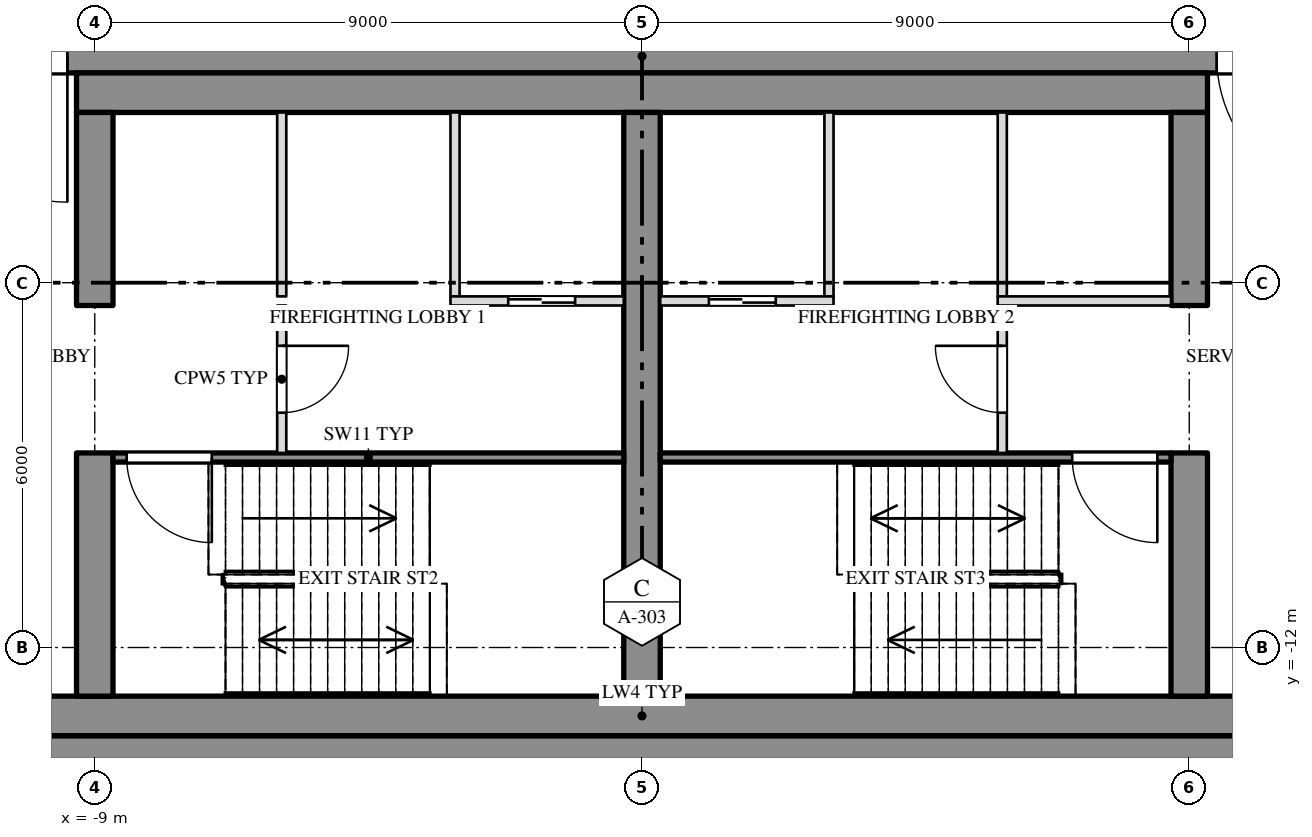
"""IFC4 building model, lengths in metres.
Left out: names, types, materials, properties, quantities, classifications, styles, units other than length and angle.
Written with IfcOpenShell. Run it as: python <this file> out.ifc"""

import sys

from ifc_helpers import new_model, si_unit, direction, frame, frame_2d, origin, place, context, subcontext, project, spatial, rectangle, extrude, element, fill, save


model = new_model("IFC4")
c1 = context("Model", 3, precision=1e-05, world=origin(), true_north=direction((0.0, 1.0)))
c2 = subcontext(c1, "Body", "Model", "MODEL_VIEW")
j1 = project(units=[si_unit("LENGTHUNIT", "METRE"), si_unit("PLANEANGLEUNIT", "RADIAN")], contexts=[c1])
p1 = place(None, origin())
s1 = spatial("IfcSite", under=j1, at=p1, CompositionType="ELEMENT")
p2 = place(p1, origin())
s2 = spatial("IfcBuilding", under=s1, at=p2, CompositionType="ELEMENT")
p3 = place(p2, frame((0.0, 0.0, 268.5)))
s3 = spatial("IfcBuildingStorey", under=s2, at=p3, CompositionType="ELEMENT", Elevation=268.5)
p4 = place(p3, frame((-27.0, -2.275, 0.0), z_axis=(0.0, 0.0, 1.0), x_axis=(1.0, 0.0, 0.0)))
e1 = element("IfcWall", 1, at=p4, inside=s3, PredefinedType="SHEAR", context=c2, shape_type="SweptSolid", body=[
    extrude(rectangle(XDim=54.0, YDim=0.55, at=frame_2d((27.0, 0.0))), origin(), (0.0, 0.0, 1.0), 3.78),
])
p5 = place(p4, frame((15.15, 0.0, 0.0)))
e2 = element("IfcOpeningElement", 2, at=p5, cuts=e1, PredefinedType="OPENING", context=c2, shape_type="SweptSolid", body=[
    extrude(rectangle(XDim=2.4, YDim=2.1, at=frame_2d((1.2, 1.05))), frame((0.0, 0.287, 0.0), z_axis=(0.0, -1.0, 0.0), x_axis=(1.0, 0.0, 0.0)), (0.0, 0.0, 1.0), 0.574),
])
p6 = place(p4, frame((36.45, 0.0, 0.0)))
e3 = element("IfcOpeningElement", 3, at=p6, cuts=e1, PredefinedType="OPENING", context=c2, shape_type="SweptSolid", body=[
    extrude(rectangle(XDim=2.4, YDim=2.1, at=frame_2d((1.2, 1.05))), frame((0.0, 0.287, 0.0), z_axis=(0.0, -1.0, 0.0), x_axis=(1.0, 0.0, 0.0)), (0.0, 0.0, 1.0), 0.574),
])
p7 = place(p3, frame((-27.0, -13.725, 0.0), z_axis=(0.0, 0.0, 1.0), x_axis=(1.0, 0.0, 0.0)))
e4 = element("IfcWall", 4, at=p7, inside=s3, PredefinedType="SHEAR", context=c2, shape_type="SweptSolid", body=[
    extrude(rectangle(XDim=54.0, YDim=0.55, at=frame_2d((27.0, 0.0))), origin(), (0.0, 0.0, 1.0), 3.78),
])
p8 = place(p3, frame((-9.3, -2.875, 0.0), z_axis=(0.0, 0.0, 1.0), x_axis=(1.0, 0.0, 0.0)))
e5 = element("IfcWall", 5, at=p8, inside=s3, PredefinedType="SHEAR", context=c2, shape_type="SweptSolid", body=[
    extrude(rectangle(XDim=18.6, YDim=0.65, at=frame_2d((9.3, 0.0))), origin(), (0.0, 0.0, 1.0), 3.78),
])
p9 = place(p3, frame((-26.45, -13.125, 0.0), z_axis=(0.0, 0.0, 1.0), x_axis=(1.0, 0.0, 0.0)))
e6 = element("IfcWall", 6, at=p9, inside=s3, PredefinedType="SHEAR", context=c2, shape_type="SweptSolid", body=[
    extrude(rectangle(XDim=52.9, YDim=0.65, at=frame_2d((26.45, 0.0))), origin(), (0.0, 0.0, 1.0), 3.78),
])
p10 = place(p3, frame((-9.0, -12.8, 0.0), z_axis=(0.0, 0.0, 1.0), x_axis=(0.0, 1.0, 0.0)))
e7 = element("IfcWall", 7, at=p10, inside=s3, PredefinedType="SHEAR", context=c2, shape_type="SweptSolid", body=[
    extrude(rectangle(XDim=4.0, YDim=0.6, at=frame_2d((2.0, 0.0))), origin(), (0.0, 0.0, 1.0), 3.78),
])
p11 = place(p3, frame((-9.0, -6.375, 0.0), z_axis=(0.0, 0.0, 1.0), x_axis=(0.0, 1.0, 0.0)))
e8 = element("IfcWall", 8, at=p11, inside=s3, PredefinedType="SHEAR", context=c2, shape_type="SweptSolid", body=[
    extrude(rectangle(XDim=3.175, YDim=0.6, at=frame_2d((1.587, 0.0))), origin(), (0.0, 0.0, 1.0), 3.78),
])
p12 = place(p3, frame((0.0, -12.8, 0.0), z_axis=(0.0, 0.0, 1.0), x_axis=(0.0, 1.0, 0.0)))
e9 = element("IfcWall", 9, at=p12, inside=s3, PredefinedType="SHEAR", context=c2, shape_type="SweptSolid", body=[
    extrude(rectangle(XDim=9.6, YDim=0.6, at=frame_2d((4.8, 0.0))), origin(), (0.0, 0.0, 1.0), 3.78),
])
p13 = place(p3, frame((9.0, -12.8, 0.0), z_axis=(0.0, 0.0, 1.0), x_axis=(0.0, 1.0, 0.0)))
e10 = element("IfcWall", 10, at=p13, inside=s3, PredefinedType="SHEAR", context=c2, shape_type="SweptSolid", body=[
    extrude(rectangle(XDim=4.0, YDim=0.6, at=frame_2d((2.0, 0.0))), origin(), (0.0, 0.0, 1.0), 3.78),
])
p14 = place(p3, frame((9.0, -6.375, 0.0), z_axis=(0.0, 0.0, 1.0), x_axis=(0.0, 1.0, 0.0)))
e11 = element("IfcWall", 11, at=p14, inside=s3, PredefinedType="SHEAR", context=c2, shape_type="SweptSolid", body=[
    extrude(rectangle(XDim=3.175, YDim=0.6, at=frame_2d((1.587, 0.0))), origin(), (0.0, 0.0, 1.0), 3.78),
])
for number, where, z_axis, x_axis in (
    (12, (-3.075, -6.225, 0.0), (0.0, 0.0, 1.0), (0.0, 1.0, 0.0)),
    (13, (-5.925, -6.225, 0.0), (0.0, 0.0, 1.0), (0.0, 1.0, 0.0)),
    (14, (3.075, -6.225, 0.0), (0.0, 0.0, 1.0), (0.0, 1.0, 0.0)),
    (15, (5.925, -6.225, 0.0), (0.0, 0.0, 1.0), (0.0, 1.0, 0.0)),
):
    element("IfcWall", number, at=place(p3, frame(where, z_axis=z_axis, x_axis=x_axis)), inside=s3, PredefinedType="PARTITIONING", context=c2, shape_type="SweptSolid", body=[
        extrude(rectangle(XDim=3.025, YDim=0.15, at=frame_2d((1.513, 0.0))), origin(), (0.0, 0.0, 1.0), 3.78),
    ])
p15 = place(p3, frame((-5.925, -8.8, 0.0), z_axis=(0.0, 0.0, 1.0), x_axis=(0.0, 1.0, 0.0)))
e16 = element("IfcWall", 16, at=p15, inside=s3, PredefinedType="PARTITIONING", context=c2, shape_type="SweptSolid", body=[
    extrude(rectangle(XDim=2.425, YDim=0.15, at=frame_2d((1.212, 0.0))), origin(), (0.0, 0.0, 1.0), 3.78),
])
p16 = place(p15, frame((0.662, 0.0, 0.0)))
e17 = element("IfcOpeningElement", 17, at=p16, cuts=e16, PredefinedType="OPENING", context=c2, shape_type="SweptSolid", body=[
    extrude(rectangle(XDim=1.1, YDim=2.1, at=frame_2d((0.55, 1.05))), frame((0.0, 0.087, 0.0), z_axis=(0.0, -1.0, 0.0), x_axis=(1.0, 0.0, 0.0)), (0.0, 0.0, 1.0), 0.174),
])
p17 = place(p3, frame((5.925, -8.8, 0.0), z_axis=(0.0, 0.0, 1.0), x_axis=(0.0, 1.0, 0.0)))
e18 = element("IfcWall", 18, at=p17, inside=s3, PredefinedType="PARTITIONING", context=c2, shape_type="SweptSolid", body=[
    extrude(rectangle(XDim=2.425, YDim=0.15, at=frame_2d((1.212, 0.0))), origin(), (0.0, 0.0, 1.0), 3.78),
])
p18 = place(p17, frame((0.662, 0.0, 0.0)))
e19 = element("IfcOpeningElement", 19, at=p18, cuts=e18, PredefinedType="OPENING", context=c2, shape_type="SweptSolid", body=[
    extrude(rectangle(XDim=1.1, YDim=2.1, at=frame_2d((0.55, 1.05))), frame((0.0, 0.087, 0.0), z_axis=(0.0, -1.0, 0.0), x_axis=(1.0, 0.0, 0.0)), (0.0, 0.0, 1.0), 0.174),
])
p19 = place(p3, frame((-3.15, -6.3, 0.0), z_axis=(0.0, 0.0, 1.0), x_axis=(1.0, 0.0, 0.0)))
e20 = element("IfcWall", 20, at=p19, inside=s3, PredefinedType="PARTITIONING", context=c2, shape_type="SweptSolid", body=[
    extrude(rectangle(XDim=2.85, YDim=0.15, at=frame_2d((1.425, 0.0))), origin(), (0.0, 0.0, 1.0), 3.78),
])
p20 = place(p19, frame((0.95, 0.0, 0.0)))
e21 = element("IfcOpeningElement", 21, at=p20, cuts=e20, PredefinedType="OPENING", context=c2, shape_type="SweptSolid", body=[
    extrude(rectangle(XDim=1.1, YDim=2.1, at=frame_2d((0.55, 1.05))), frame((0.0, 0.087, 0.0), z_axis=(0.0, -1.0, 0.0), x_axis=(1.0, 0.0, 0.0)), (0.0, 0.0, 1.0), 0.174),
])
p21 = place(p3, frame((0.3, -6.3, 0.0), z_axis=(0.0, 0.0, 1.0), x_axis=(1.0, 0.0, 0.0)))
e22 = element("IfcWall", 22, at=p21, inside=s3, PredefinedType="PARTITIONING", context=c2, shape_type="SweptSolid", body=[
    extrude(rectangle(XDim=2.85, YDim=0.15, at=frame_2d((1.425, 0.0))), origin(), (0.0, 0.0, 1.0), 3.78),
])
p22 = place(p21, frame((0.8, 0.0, 0.0)))
e23 = element("IfcOpeningElement", 23, at=p22, cuts=e22, PredefinedType="OPENING", context=c2, shape_type="SweptSolid", body=[
    extrude(rectangle(XDim=1.1, YDim=2.1, at=frame_2d((0.55, 1.05))), frame((0.0, 0.087, 0.0), z_axis=(0.0, -1.0, 0.0), x_axis=(1.0, 0.0, 0.0)), (0.0, 0.0, 1.0), 0.174),
])
p23 = place(p3, frame((5.85, -6.3, 0.0), z_axis=(0.0, 0.0, 1.0), x_axis=(1.0, 0.0, 0.0)))
e24 = element("IfcWall", 24, at=p23, inside=s3, PredefinedType="PARTITIONING", context=c2, shape_type="SweptSolid", body=[
    extrude(rectangle(XDim=2.85, YDim=0.15, at=frame_2d((1.425, 0.0))), origin(), (0.0, 0.0, 1.0), 3.78),
])
p24 = place(p3, frame((-8.7, -8.875, 0.0), z_axis=(0.0, 0.0, 1.0), x_axis=(1.0, 0.0, 0.0)))
e25 = element("IfcWall", 25, at=p24, inside=s3, PredefinedType="SHEAR", context=c2, shape_type="SweptSolid", body=[
    extrude(rectangle(XDim=8.4, YDim=0.15, at=frame_2d((4.2, 0.0))), origin(), (0.0, 0.0, 1.0), 3.78),
])
p25 = place(p24, frame((0.225, 0.0, 0.0)))
e26 = element("IfcOpeningElement", 26, at=p25, cuts=e25, PredefinedType="OPENING", context=c2, shape_type="SweptSolid", body=[
    extrude(rectangle(XDim=1.4, YDim=2.1, at=frame_2d((0.7, 1.05))), frame((0.0, 0.087, 0.0), z_axis=(0.0, -1.0, 0.0), x_axis=(1.0, 0.0, 0.0)), (0.0, 0.0, 1.0), 0.174),
])
p26 = place(p3, frame((0.3, -8.875, 0.0), z_axis=(0.0, 0.0, 1.0), x_axis=(1.0, 0.0, 0.0)))
e27 = element("IfcWall", 27, at=p26, inside=s3, PredefinedType="SHEAR", context=c2, shape_type="SweptSolid", body=[
    extrude(rectangle(XDim=8.4, YDim=0.15, at=frame_2d((4.2, 0.0))), origin(), (0.0, 0.0, 1.0), 3.78),
])
p27 = place(p26, frame((6.775, 0.0, 0.0)))
e28 = element("IfcOpeningElement", 28, at=p27, cuts=e27, PredefinedType="OPENING", context=c2, shape_type="SweptSolid", body=[
    extrude(rectangle(XDim=1.4, YDim=2.1, at=frame_2d((0.7, 1.05))), frame((0.0, 0.087, 0.0), z_axis=(0.0, -1.0, 0.0), x_axis=(1.0, 0.0, 0.0)), (0.0, 0.0, 1.0), 0.174),
])
p28 = place(p5, origin())
e29 = element("IfcDoor", 29, at=p28, inside=s3, OperationType="DOUBLE_DOOR_SINGLE_SWING", PredefinedType="DOOR", context=c2, shape_type="SweptSolid", body=[
    extrude(rectangle(XDim=2.4, YDim=2.1, at=frame_2d((1.2, 1.05))), frame((0.0, 0.025, 0.0), z_axis=(0.0, -1.0, 0.0), x_axis=(1.0, 0.0, 0.0)), (0.0, 0.0, 1.0), 0.05),
])
fill(e2, e29)
p29 = place(p25, origin())
e30 = element("IfcDoor", 30, at=p29, inside=s3, OperationType="DOUBLE_DOOR_SINGLE_SWING", PredefinedType="DOOR", context=c2, shape_type="SweptSolid", body=[
    extrude(rectangle(XDim=1.4, YDim=2.1, at=frame_2d((0.7, 1.05))), frame((0.0, 0.025, 0.0), z_axis=(0.0, -1.0, 0.0), x_axis=(1.0, 0.0, 0.0)), (0.0, 0.0, 1.0), 0.05),
])
fill(e26, e30)
p30 = place(p16, origin())
e31 = element("IfcDoor", 31, at=p30, inside=s3, OperationType="SINGLE_SWING_LEFT", PredefinedType="DOOR", context=c2, shape_type="SweptSolid", body=[
    extrude(rectangle(XDim=1.1, YDim=2.1, at=frame_2d((0.55, 1.05))), frame((0.0, 0.025, 0.0), z_axis=(0.0, -1.0, 0.0), x_axis=(1.0, 0.0, 0.0)), (0.0, 0.0, 1.0), 0.05),
])
fill(e17, e31)
p31 = place(p20, origin())
e32 = element("IfcDoor", 32, at=p31, inside=s3, OperationType="SLIDING_TO_LEFT", PredefinedType="DOOR", context=c2, shape_type="SweptSolid", body=[
    extrude(rectangle(XDim=1.1, YDim=2.1, at=frame_2d((0.55, 1.05))), frame((0.0, 0.025, 0.0), z_axis=(0.0, -1.0, 0.0), x_axis=(1.0, 0.0, 0.0)), (0.0, 0.0, 1.0), 0.05),
])
fill(e21, e32)
p32 = place(p22, origin())
e33 = element("IfcDoor", 33, at=p32, inside=s3, OperationType="SLIDING_TO_RIGHT", PredefinedType="DOOR", context=c2, shape_type="SweptSolid", body=[
    extrude(rectangle(XDim=1.1, YDim=2.1, at=frame_2d((0.55, 1.05))), frame((0.0, 0.025, 0.0), z_axis=(0.0, -1.0, 0.0), x_axis=(1.0, 0.0, 0.0)), (0.0, 0.0, 1.0), 0.05),
])
fill(e23, e33)
p33 = place(p18, origin())
e34 = element("IfcDoor", 34, at=p33, inside=s3, OperationType="SINGLE_SWING_RIGHT", PredefinedType="DOOR", context=c2, shape_type="SweptSolid", body=[
    extrude(rectangle(XDim=1.1, YDim=2.1, at=frame_2d((0.55, 1.05))), frame((0.0, 0.025, 0.0), z_axis=(0.0, -1.0, 0.0), x_axis=(1.0, 0.0, 0.0)), (0.0, 0.0, 1.0), 0.05),
])
fill(e19, e34)
p34 = place(p27, origin())
e35 = element("IfcDoor", 35, at=p34, inside=s3, OperationType="DOUBLE_DOOR_SINGLE_SWING", PredefinedType="DOOR", context=c2, shape_type="SweptSolid", body=[
    extrude(rectangle(XDim=1.4, YDim=2.1, at=frame_2d((0.7, 1.05))), frame((0.0, 0.025, 0.0), z_axis=(0.0, -1.0, 0.0), x_axis=(1.0, 0.0, 0.0)), (0.0, 0.0, 1.0), 0.05),
])
fill(e28, e35)
p35 = place(p6, origin())
e36 = element("IfcDoor", 36, at=p35, inside=s3, OperationType="DOUBLE_DOOR_SINGLE_SWING", PredefinedType="DOOR", context=c2, shape_type="SweptSolid", body=[
    extrude(rectangle(XDim=2.4, YDim=2.1, at=frame_2d((1.2, 1.05))), frame((0.0, 0.025, 0.0), z_axis=(0.0, -1.0, 0.0), x_axis=(1.0, 0.0, 0.0)), (0.0, 0.0, 1.0), 0.05),
])
fill(e3, e36)
save(model, sys.argv[1])
